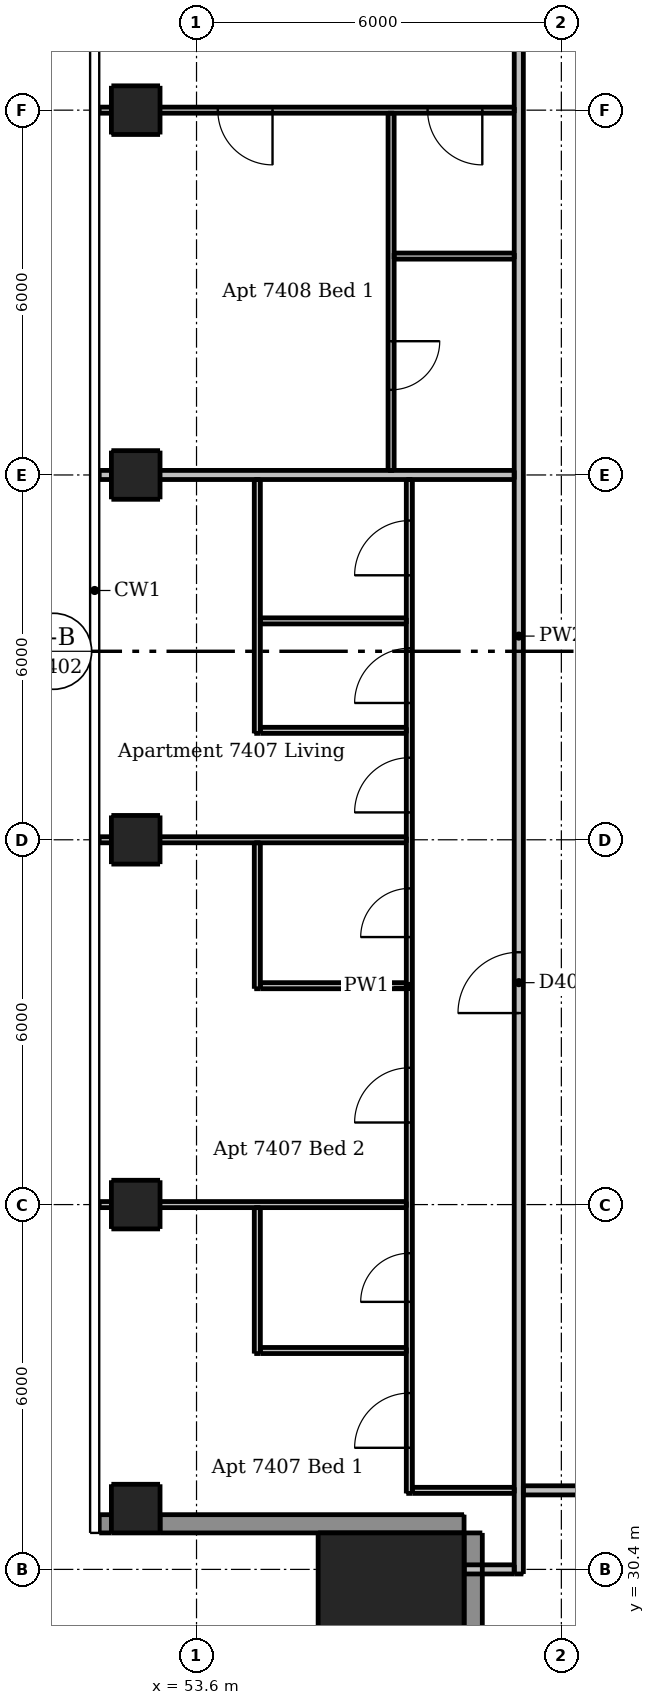
"""IFC4 building model, lengths in metres.
Left out: names, types, materials, properties, quantities, classifications, styles, units other than length and angle.
Written with IfcOpenShell. Run it as: python <this file> out.ifc"""

import sys

from ifc_helpers import new_model, si_unit, direction, frame, frame_2d, origin, origin_2d, place, context, subcontext, project, spatial, rectangle, extrude, element, fill, save


model = new_model("IFC4")
c1 = context("Model", 3, precision=1e-05, world=origin(), true_north=direction((0.0, 1.0)))
c2 = subcontext(c1, "Body", "Model", "MODEL_VIEW")
j1 = project(units=[si_unit("LENGTHUNIT", "METRE"), si_unit("PLANEANGLEUNIT", "RADIAN")], contexts=[c1])
p1 = place(None, origin())
s1 = spatial("IfcSite", under=j1, at=p1, CompositionType="ELEMENT")
p2 = place(p1, origin())
s2 = spatial("IfcBuilding", under=s1, at=p2, CompositionType="ELEMENT")
p3 = place(p2, frame((0.0, 0.0, 275.2)))
s3 = spatial("IfcBuildingStorey", under=s2, at=p3, CompositionType="ELEMENT", Elevation=275.2)
for number, where, z_axis, x_axis in (
    (1, (52.6, 31.4, 0.0), (0.0, 0.0, 1.0), (1.0, 0.0, 0.0)),
    (2, (52.6, 36.4, 0.0), (0.0, 0.0, 1.0), (1.0, 0.0, 0.0)),
    (3, (52.6, 42.4, 0.0), (0.0, 0.0, 1.0), (1.0, 0.0, 0.0)),
    (4, (52.6, 48.4, 0.0), (0.0, 0.0, 1.0), (1.0, 0.0, 0.0)),
    (5, (52.6, 54.4, 0.0), (0.0, 0.0, 1.0), (1.0, 0.0, 0.0)),
):
    element("IfcColumn", number, at=place(p3, frame(where, z_axis=z_axis, x_axis=x_axis)), inside=s3, PredefinedType="COLUMN", context=c2, shape_type="SweptSolid", body=[
        extrude(rectangle(XDim=0.8, YDim=0.8, at=origin_2d()), origin(), (0.0, 0.0, 1.0), 3.05),
    ])
p4 = place(p3, frame((56.8, 29.8, 0.0), z_axis=(0.0, 0.0, 1.0), x_axis=(1.0, 0.0, 0.0)))
e6 = element("IfcColumn", 6, at=p4, inside=s3, PredefinedType="COLUMN", context=c2, shape_type="SweptSolid", body=[
    extrude(rectangle(XDim=2.4, YDim=2.4, at=origin_2d()), origin(), (0.0, 0.0, 1.0), 3.3),
])
p5 = place(p3, frame((52.0, 31.15, 0.0), z_axis=(0.0, 0.0, 1.0), x_axis=(1.0, 0.0, 0.0)))
e7 = element("IfcWall", 7, at=p5, inside=s3, PredefinedType="SOLIDWALL", context=c2, shape_type="SweptSolid", body=[
    extrude(rectangle(XDim=0.2, YDim=0.3, at=frame_2d((0.1, 0.0))), origin(), (0.0, 0.0, 1.0), 3.05),
])
p6 = place(p3, frame((53.0, 31.15, 0.0), z_axis=(0.0, 0.0, 1.0), x_axis=(1.0, 0.0, 0.0)))
e8 = element("IfcWall", 8, at=p6, inside=s3, PredefinedType="SOLIDWALL", context=c2, shape_type="SweptSolid", body=[
    extrude(rectangle(XDim=5.0, YDim=0.3, at=frame_2d((2.5, 0.0))), origin(), (0.0, 0.0, 1.0), 3.05),
])
p7 = place(p3, frame((58.15, 31.0, 0.0), z_axis=(0.0, 0.0, 1.0), x_axis=(0.0, -1.0, 0.0)))
e9 = element("IfcWall", 9, at=p7, inside=s3, PredefinedType="SOLIDWALL", context=c2, shape_type="SweptSolid", body=[
    extrude(rectangle(XDim=6.0, YDim=0.3, at=frame_2d((3.0, 0.0))), origin(), (0.0, 0.0, 1.0), 3.05),
])
p8 = place(p7, frame((1.8, 0.0, 0.15)))
e10 = element("IfcOpeningElement", 10, at=p8, cuts=e9, PredefinedType="OPENING", context=c2, shape_type="SweptSolid", body=[
    extrude(rectangle(XDim=2.4, YDim=2.1, at=frame_2d((1.2, 1.05))), frame((0.0, 0.16, 0.0), z_axis=(0.0, -1.0, 0.0), x_axis=(1.0, 0.0, 0.0)), (0.0, 0.0, 1.0), 0.32),
])
for number, where, z_axis, x_axis in (
    (11, (54.6, 33.95, 0.0), (0.0, 0.0, 1.0), (0.0, 1.0, 0.0)),
    (12, (54.6, 39.95, 0.0), (0.0, 0.0, 1.0), (0.0, 1.0, 0.0)),
):
    element("IfcWall", number, at=place(p3, frame(where, z_axis=z_axis, x_axis=x_axis)), inside=s3, PredefinedType="PARTITIONING", context=c2, shape_type="SweptSolid", body=[
        extrude(rectangle(XDim=2.4, YDim=0.1, at=frame_2d((1.2, 0.0))), origin(), (0.0, 0.0, 1.0), 3.05),
    ])
p9 = place(p3, frame((54.6, 44.15, 0.0), z_axis=(0.0, 0.0, 1.0), x_axis=(0.0, 1.0, 0.0)))
e13 = element("IfcWall", 13, at=p9, inside=s3, PredefinedType="PARTITIONING", context=c2, shape_type="SweptSolid", body=[
    extrude(rectangle(XDim=4.175, YDim=0.1, at=frame_2d((2.087, 0.0))), origin(), (0.0, 0.0, 1.0), 3.05),
])
p10 = place(p3, frame((56.8, 54.35, 0.0), z_axis=(0.0, 0.0, 1.0), x_axis=(0.0, -1.0, 0.0)))
e14 = element("IfcWall", 14, at=p10, inside=s3, PredefinedType="PARTITIONING", context=c2, shape_type="SweptSolid", body=[
    extrude(rectangle(XDim=5.875, YDim=0.1, at=frame_2d((2.938, 0.0))), origin(), (0.0, 0.0, 1.0), 3.05),
])
p11 = place(p10, frame((3.75, 0.0, 0.0)))
e15 = element("IfcOpeningElement", 15, at=p11, cuts=e14, PredefinedType="OPENING", context=c2, shape_type="SweptSolid", body=[
    extrude(rectangle(XDim=0.8, YDim=2.1, at=frame_2d((0.4, 1.05))), frame((0.0, 0.06, 0.0), z_axis=(0.0, -1.0, 0.0), x_axis=(1.0, 0.0, 0.0)), (0.0, 0.0, 1.0), 0.12),
])
p12 = place(p3, frame((57.1, 31.65, 0.0), z_axis=(0.0, 0.0, 1.0), x_axis=(0.0, 1.0, 0.0)))
e16 = element("IfcWall", 16, at=p12, inside=s3, PredefinedType="PARTITIONING", context=c2, shape_type="SweptSolid", body=[
    extrude(rectangle(XDim=16.675, YDim=0.1, at=frame_2d((8.337, 0.0))), origin(), (0.0, 0.0, 1.0), 3.05),
])
p13 = place(p12, frame((11.2, 0.0, 0.0)))
e17 = element("IfcOpeningElement", 17, at=p13, cuts=e16, PredefinedType="OPENING", context=c2, shape_type="SweptSolid", body=[
    extrude(rectangle(XDim=0.9, YDim=2.1, at=frame_2d((0.45, 1.05))), frame((0.0, 0.06, 0.0), z_axis=(0.0, -1.0, 0.0), x_axis=(1.0, 0.0, 0.0)), (0.0, 0.0, 1.0), 0.12),
])
p14 = place(p12, frame((15.1, 0.0, 0.0)))
e18 = element("IfcOpeningElement", 18, at=p14, cuts=e16, PredefinedType="OPENING", context=c2, shape_type="SweptSolid", body=[
    extrude(rectangle(XDim=0.9, YDim=2.1, at=frame_2d((0.45, 1.05))), frame((0.0, 0.06, 0.0), z_axis=(0.0, -1.0, 0.0), x_axis=(1.0, 0.0, 0.0)), (0.0, 0.0, 1.0), 0.12),
])
p15 = place(p12, frame((13.0, 0.0, 0.0)))
e19 = element("IfcOpeningElement", 19, at=p15, cuts=e16, PredefinedType="OPENING", context=c2, shape_type="SweptSolid", body=[
    extrude(rectangle(XDim=0.9, YDim=2.1, at=frame_2d((0.45, 1.05))), frame((0.0, 0.06, 0.0), z_axis=(0.0, -1.0, 0.0), x_axis=(1.0, 0.0, 0.0)), (0.0, 0.0, 1.0), 0.12),
])
p16 = place(p12, frame((0.75, 0.0, 0.0)))
e20 = element("IfcOpeningElement", 20, at=p16, cuts=e16, PredefinedType="OPENING", context=c2, shape_type="SweptSolid", body=[
    extrude(rectangle(XDim=0.9, YDim=2.1, at=frame_2d((0.45, 1.05))), frame((0.0, 0.06, 0.0), z_axis=(0.0, -1.0, 0.0), x_axis=(1.0, 0.0, 0.0)), (0.0, 0.0, 1.0), 0.12),
])
p17 = place(p12, frame((6.1, 0.0, 0.0)))
e21 = element("IfcOpeningElement", 21, at=p17, cuts=e16, PredefinedType="OPENING", context=c2, shape_type="SweptSolid", body=[
    extrude(rectangle(XDim=0.9, YDim=2.1, at=frame_2d((0.45, 1.05))), frame((0.0, 0.06, 0.0), z_axis=(0.0, -1.0, 0.0), x_axis=(1.0, 0.0, 0.0)), (0.0, 0.0, 1.0), 0.12),
])
p18 = place(p12, frame((3.15, 0.0, 0.0)))
e22 = element("IfcOpeningElement", 22, at=p18, cuts=e16, PredefinedType="OPENING", context=c2, shape_type="SweptSolid", body=[
    extrude(rectangle(XDim=0.8, YDim=2.1, at=frame_2d((0.4, 1.05))), frame((0.0, 0.06, 0.0), z_axis=(0.0, -1.0, 0.0), x_axis=(1.0, 0.0, 0.0)), (0.0, 0.0, 1.0), 0.12),
])
p19 = place(p12, frame((9.15, 0.0, 0.0)))
e23 = element("IfcOpeningElement", 23, at=p19, cuts=e16, PredefinedType="OPENING", context=c2, shape_type="SweptSolid", body=[
    extrude(rectangle(XDim=0.8, YDim=2.1, at=frame_2d((0.4, 1.05))), frame((0.0, 0.06, 0.0), z_axis=(0.0, -1.0, 0.0), x_axis=(1.0, 0.0, 0.0)), (0.0, 0.0, 1.0), 0.12),
])
p20 = place(p3, frame((58.825, 54.4, 0.0), z_axis=(0.0, 0.0, 1.0), x_axis=(-1.0, 0.0, 0.0)))
e24 = element("IfcWall", 24, at=p20, inside=s3, PredefinedType="PARTITIONING", context=c2, shape_type="SweptSolid", body=[
    extrude(rectangle(XDim=6.825, YDim=0.1, at=frame_2d((3.413, 0.0))), origin(), (0.0, 0.0, 1.0), 2.516),
])
p21 = place(p20, frame((0.525, 0.0, 0.0)))
e25 = element("IfcOpeningElement", 25, at=p21, cuts=e24, PredefinedType="OPENING", context=c2, shape_type="SweptSolid", body=[
    extrude(rectangle(XDim=0.9, YDim=2.1, at=frame_2d((0.45, 1.05))), frame((0.0, 0.06, 0.0), z_axis=(0.0, -1.0, 0.0), x_axis=(1.0, 0.0, 0.0)), (0.0, 0.0, 1.0), 0.12),
])
p22 = place(p20, frame((3.975, 0.0, 0.0)))
e26 = element("IfcOpeningElement", 26, at=p22, cuts=e24, PredefinedType="OPENING", context=c2, shape_type="SweptSolid", body=[
    extrude(rectangle(XDim=0.9, YDim=2.1, at=frame_2d((0.45, 1.05))), frame((0.0, 0.06, 0.0), z_axis=(0.0, -1.0, 0.0), x_axis=(1.0, 0.0, 0.0)), (0.0, 0.0, 1.0), 0.12),
])
p23 = place(p3, frame((56.85, 52.0, 0.0), z_axis=(0.0, 0.0, 1.0), x_axis=(1.0, 0.0, 0.0)))
e27 = element("IfcWall", 27, at=p23, inside=s3, PredefinedType="PARTITIONING", context=c2, shape_type="SweptSolid", body=[
    extrude(rectangle(XDim=1.975, YDim=0.1, at=frame_2d((0.987, 0.0))), origin(), (0.0, 0.0, 1.0), 3.05),
])
for number, where, z_axis, x_axis in (
    (28, (54.65, 46.0, 0.0), (0.0, 0.0, 1.0), (1.0, 0.0, 0.0)),
    (29, (54.65, 44.2, 0.0), (0.0, 0.0, 1.0), (1.0, 0.0, 0.0)),
):
    element("IfcWall", number, at=place(p3, frame(where, z_axis=z_axis, x_axis=x_axis)), inside=s3, PredefinedType="PARTITIONING", context=c2, shape_type="SweptSolid", body=[
        extrude(rectangle(XDim=2.4, YDim=0.1, at=frame_2d((1.2, 0.0))), origin(), (0.0, 0.0, 1.0), 3.05),
    ])
p24 = place(p3, frame((52.0, 42.4, 0.0), z_axis=(0.0, 0.0, 1.0), x_axis=(1.0, 0.0, 0.0)))
e30 = element("IfcWall", 30, at=p24, inside=s3, PredefinedType="PARTITIONING", context=c2, shape_type="SweptSolid", body=[
    extrude(rectangle(XDim=5.05, YDim=0.1, at=frame_2d((2.525, 0.0))), origin(), (0.0, 0.0, 1.0), 2.516),
])
p25 = place(p3, frame((54.65, 40.0, 0.0), z_axis=(0.0, 0.0, 1.0), x_axis=(1.0, 0.0, 0.0)))
e31 = element("IfcWall", 31, at=p25, inside=s3, PredefinedType="PARTITIONING", context=c2, shape_type="SweptSolid", body=[
    extrude(rectangle(XDim=2.4, YDim=0.1, at=frame_2d((1.2, 0.0))), origin(), (0.0, 0.0, 1.0), 3.05),
])
p26 = place(p3, frame((52.0, 36.4, 0.0), z_axis=(0.0, 0.0, 1.0), x_axis=(1.0, 0.0, 0.0)))
e32 = element("IfcWall", 32, at=p26, inside=s3, PredefinedType="PARTITIONING", context=c2, shape_type="SweptSolid", body=[
    extrude(rectangle(XDim=5.05, YDim=0.1, at=frame_2d((2.525, 0.0))), origin(), (0.0, 0.0, 1.0), 2.516),
])
p27 = place(p3, frame((54.65, 34.0, 0.0), z_axis=(0.0, 0.0, 1.0), x_axis=(1.0, 0.0, 0.0)))
e33 = element("IfcWall", 33, at=p27, inside=s3, PredefinedType="PARTITIONING", context=c2, shape_type="SweptSolid", body=[
    extrude(rectangle(XDim=2.4, YDim=0.1, at=frame_2d((1.2, 0.0))), origin(), (0.0, 0.0, 1.0), 3.05),
])
p28 = place(p3, frame((57.15, 31.7, 0.0), z_axis=(0.0, 0.0, 1.0), x_axis=(1.0, 0.0, 0.0)))
e34 = element("IfcWall", 34, at=p28, inside=s3, PredefinedType="PARTITIONING", context=c2, shape_type="SweptSolid", body=[
    extrude(rectangle(XDim=1.675, YDim=0.1, at=frame_2d((0.837, 0.0))), origin(), (0.0, 0.0, 1.0), 3.05),
])
p29 = place(p3, frame((58.9, 30.325, 0.0), z_axis=(0.0, 0.0, 1.0), x_axis=(0.0, 1.0, 0.0)))
e35 = element("IfcWall", 35, at=p29, inside=s3, PredefinedType="PARTITIONING", context=c2, shape_type="SweptSolid", body=[
    extrude(rectangle(XDim=30.85, YDim=0.15, at=frame_2d((15.425, 0.0))), origin(), (0.0, 0.0, 1.0), 3.05),
])
p30 = place(p29, frame((9.225, 0.0, 0.0)))
e36 = element("IfcOpeningElement", 36, at=p30, cuts=e35, PredefinedType="OPENING", context=c2, shape_type="SweptSolid", body=[
    extrude(rectangle(XDim=1.0, YDim=2.1, at=frame_2d((0.5, 1.05))), frame((0.0, 0.085, 0.0), z_axis=(0.0, -1.0, 0.0), x_axis=(1.0, 0.0, 0.0)), (0.0, 0.0, 1.0), 0.17),
])
p31 = place(p29, frame((26.925, 0.0, 0.0)))
e37 = element("IfcOpeningElement", 37, at=p31, cuts=e35, PredefinedType="OPENING", context=c2, shape_type="SweptSolid", body=[
    extrude(rectangle(XDim=1.0, YDim=2.1, at=frame_2d((0.5, 1.05))), frame((0.0, 0.085, 0.0), z_axis=(0.0, -1.0, 0.0), x_axis=(1.0, 0.0, 0.0)), (0.0, 0.0, 1.0), 0.17),
])
p32 = place(p3, frame((52.0, 48.4, 0.0), z_axis=(0.0, 0.0, 1.0), x_axis=(1.0, 0.0, 0.0)))
e38 = element("IfcWall", 38, at=p32, inside=s3, PredefinedType="PARTITIONING", context=c2, shape_type="SweptSolid", body=[
    extrude(rectangle(XDim=6.825, YDim=0.15, at=frame_2d((3.413, 0.0))), origin(), (0.0, 0.0, 1.0), 2.516),
])
p33 = place(p3, frame((89.525, 31.7, 0.0), z_axis=(0.0, 0.0, 1.0), x_axis=(-1.0, 0.0, 0.0)))
e39 = element("IfcWall", 39, at=p33, inside=s3, PredefinedType="PARTITIONING", context=c2, shape_type="SweptSolid", body=[
    extrude(rectangle(XDim=30.55, YDim=0.15, at=frame_2d((15.275, 0.0))), origin(), (0.0, 0.0, 1.0), 3.05),
])
p34 = place(p33, frame((26.775, 0.0, 0.0)))
e40 = element("IfcOpeningElement", 40, at=p34, cuts=e39, PredefinedType="OPENING", context=c2, shape_type="SweptSolid", body=[
    extrude(rectangle(XDim=1.0, YDim=2.1, at=frame_2d((0.5, 1.05))), frame((0.0, 0.085, 0.0), z_axis=(0.0, -1.0, 0.0), x_axis=(1.0, 0.0, 0.0)), (0.0, 0.0, 1.0), 0.17),
])
p35 = place(p33, frame((9.363, 0.0, 0.0)))
e41 = element("IfcOpeningElement", 41, at=p35, cuts=e39, PredefinedType="OPENING", context=c2, shape_type="SweptSolid", body=[
    extrude(rectangle(XDim=1.0, YDim=2.1, at=frame_2d((0.5, 1.05))), frame((0.0, 0.085, 0.0), z_axis=(0.0, -1.0, 0.0), x_axis=(1.0, 0.0, 0.0)), (0.0, 0.0, 1.0), 0.17),
])
p36 = place(p3, frame((58.0, 30.4, 0.0), z_axis=(0.0, 0.0, 1.0), x_axis=(1.0, 0.0, 0.0)))
e42 = element("IfcWall", 42, at=p36, inside=s3, PredefinedType="PARTITIONING", context=c2, shape_type="SweptSolid", body=[
    extrude(rectangle(XDim=0.825, YDim=0.15, at=frame_2d((0.413, 0.0))), origin(), (0.0, 0.0, 1.0), 3.05),
])
p37 = place(p30, origin())
e43 = element("IfcDoor", 43, at=p37, inside=s3, OperationType="SINGLE_SWING_LEFT", PredefinedType="DOOR", context=c2, shape_type="SweptSolid", body=[
    extrude(rectangle(XDim=1.0, YDim=2.1, at=frame_2d((0.5, 1.05))), frame((0.0, 0.025, 0.0), z_axis=(0.0, -1.0, 0.0), x_axis=(1.0, 0.0, 0.0)), (0.0, 0.0, 1.0), 0.05),
])
fill(e36, e43)
p38 = place(p13, origin())
e44 = element("IfcDoor", 44, at=p38, inside=s3, OperationType="SINGLE_SWING_LEFT", PredefinedType="DOOR", context=c2, shape_type="SweptSolid", body=[
    extrude(rectangle(XDim=0.9, YDim=2.1, at=frame_2d((0.45, 1.05))), frame((0.0, 0.025, 0.0), z_axis=(0.0, -1.0, 0.0), x_axis=(1.0, 0.0, 0.0)), (0.0, 0.0, 1.0), 0.05),
])
fill(e17, e44)
p39 = place(p14, origin())
e45 = element("IfcDoor", 45, at=p39, inside=s3, OperationType="SINGLE_SWING_LEFT", PredefinedType="DOOR", context=c2, shape_type="SweptSolid", body=[
    extrude(rectangle(XDim=0.9, YDim=2.1, at=frame_2d((0.45, 1.05))), frame((0.0, 0.025, 0.0), z_axis=(0.0, -1.0, 0.0), x_axis=(1.0, 0.0, 0.0)), (0.0, 0.0, 1.0), 0.05),
])
fill(e18, e45)
p40 = place(p15, origin())
e46 = element("IfcDoor", 46, at=p40, inside=s3, OperationType="SINGLE_SWING_LEFT", PredefinedType="DOOR", context=c2, shape_type="SweptSolid", body=[
    extrude(rectangle(XDim=0.9, YDim=2.1, at=frame_2d((0.45, 1.05))), frame((0.0, 0.025, 0.0), z_axis=(0.0, -1.0, 0.0), x_axis=(1.0, 0.0, 0.0)), (0.0, 0.0, 1.0), 0.05),
])
fill(e19, e46)
p41 = place(p16, origin())
e47 = element("IfcDoor", 47, at=p41, inside=s3, OperationType="SINGLE_SWING_LEFT", PredefinedType="DOOR", context=c2, shape_type="SweptSolid", body=[
    extrude(rectangle(XDim=0.9, YDim=2.1, at=frame_2d((0.45, 1.05))), frame((0.0, 0.025, 0.0), z_axis=(0.0, -1.0, 0.0), x_axis=(1.0, 0.0, 0.0)), (0.0, 0.0, 1.0), 0.05),
])
fill(e20, e47)
p42 = place(p17, origin())
e48 = element("IfcDoor", 48, at=p42, inside=s3, OperationType="SINGLE_SWING_LEFT", PredefinedType="DOOR", context=c2, shape_type="SweptSolid", body=[
    extrude(rectangle(XDim=0.9, YDim=2.1, at=frame_2d((0.45, 1.05))), frame((0.0, 0.025, 0.0), z_axis=(0.0, -1.0, 0.0), x_axis=(1.0, 0.0, 0.0)), (0.0, 0.0, 1.0), 0.05),
])
fill(e21, e48)
p43 = place(p18, origin())
e49 = element("IfcDoor", 49, at=p43, inside=s3, OperationType="SINGLE_SWING_LEFT", PredefinedType="DOOR", context=c2, shape_type="SweptSolid", body=[
    extrude(rectangle(XDim=0.8, YDim=2.1, at=frame_2d((0.4, 1.05))), frame((0.0, 0.025, 0.0), z_axis=(0.0, -1.0, 0.0), x_axis=(1.0, 0.0, 0.0)), (0.0, 0.0, 1.0), 0.05),
])
fill(e22, e49)
p44 = place(p19, origin())
e50 = element("IfcDoor", 50, at=p44, inside=s3, OperationType="SINGLE_SWING_LEFT", PredefinedType="DOOR", context=c2, shape_type="SweptSolid", body=[
    extrude(rectangle(XDim=0.8, YDim=2.1, at=frame_2d((0.4, 1.05))), frame((0.0, 0.025, 0.0), z_axis=(0.0, -1.0, 0.0), x_axis=(1.0, 0.0, 0.0)), (0.0, 0.0, 1.0), 0.05),
])
fill(e23, e50)
p45 = place(p21, origin())
e51 = element("IfcDoor", 51, at=p45, inside=s3, OperationType="SINGLE_SWING_LEFT", PredefinedType="DOOR", context=c2, shape_type="SweptSolid", body=[
    extrude(rectangle(XDim=0.9, YDim=2.1, at=frame_2d((0.45, 1.05))), frame((0.0, 0.025, 0.0), z_axis=(0.0, -1.0, 0.0), x_axis=(1.0, 0.0, 0.0)), (0.0, 0.0, 1.0), 0.05),
])
fill(e25, e51)
p46 = place(p22, origin())
e52 = element("IfcDoor", 52, at=p46, inside=s3, OperationType="SINGLE_SWING_LEFT", PredefinedType="DOOR", context=c2, shape_type="SweptSolid", body=[
    extrude(rectangle(XDim=0.9, YDim=2.1, at=frame_2d((0.45, 1.05))), frame((0.0, 0.025, 0.0), z_axis=(0.0, -1.0, 0.0), x_axis=(1.0, 0.0, 0.0)), (0.0, 0.0, 1.0), 0.05),
])
fill(e26, e52)
p47 = place(p11, origin())
e53 = element("IfcDoor", 53, at=p47, inside=s3, OperationType="SINGLE_SWING_LEFT", PredefinedType="DOOR", context=c2, shape_type="SweptSolid", body=[
    extrude(rectangle(XDim=0.8, YDim=2.1, at=frame_2d((0.4, 1.05))), frame((0.0, 0.025, 0.0), z_axis=(0.0, -1.0, 0.0), x_axis=(1.0, 0.0, 0.0)), (0.0, 0.0, 1.0), 0.05),
])
fill(e15, e53)
save(model, sys.argv[1])
